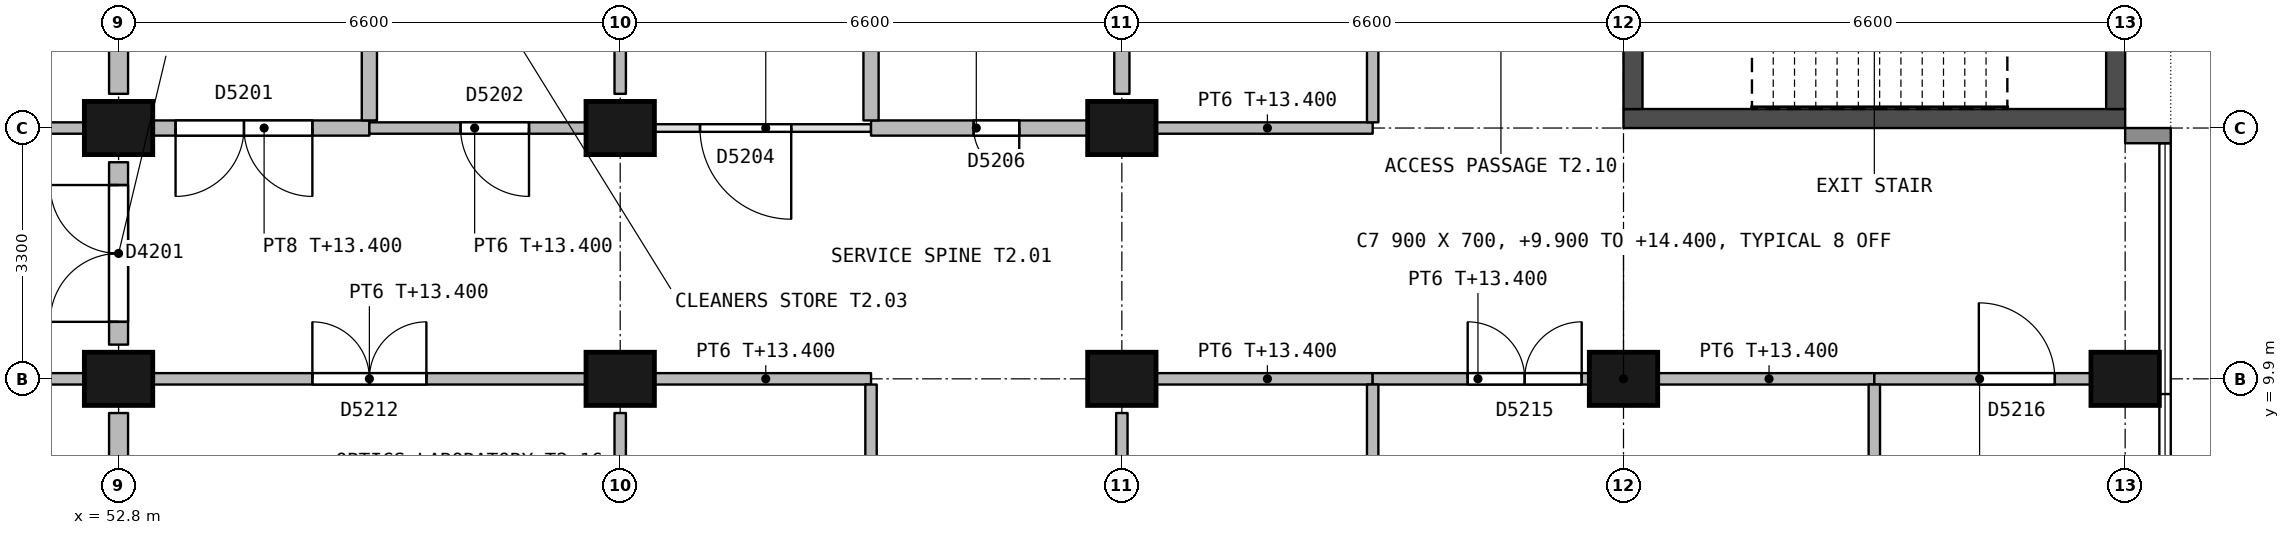
"""IFC4 building model, lengths in metres.
Left out: names, types, materials, properties, quantities, classifications, styles, units other than length and angle.
Written with IfcOpenShell. Run it as: python <this file> out.ifc"""

import sys

from ifc_helpers import new_model, si_unit, direction, frame, frame_2d, origin, origin_2d, place, context, subcontext, project, spatial, rectangle, extrude, element, fill, save


model = new_model("IFC4")
c1 = context("Model", 3, precision=1e-05, world=origin(), true_north=direction((0.0, 1.0)))
c2 = subcontext(c1, "Body", "Model", "MODEL_VIEW")
j1 = project(units=[si_unit("LENGTHUNIT", "METRE"), si_unit("PLANEANGLEUNIT", "RADIAN")], contexts=[c1])
p1 = place(None, origin())
s1 = spatial("IfcSite", under=j1, at=p1, CompositionType="ELEMENT")
p2 = place(p1, origin())
s2 = spatial("IfcBuilding", under=s1, at=p2, CompositionType="ELEMENT")
p3 = place(p2, frame((0.0, 0.0, 9.9)))
s3 = spatial("IfcBuildingStorey", under=s2, at=p3, CompositionType="ELEMENT", Elevation=9.9)
for number, where, z_axis, x_axis in (
    (1, (52.8, 9.9, 0.0), (0.0, 0.0, 1.0), (1.0, 0.0, 0.0)),
    (2, (52.8, 13.2, 0.0), (0.0, 0.0, 1.0), (1.0, 0.0, 0.0)),
    (3, (59.4, 9.9, 0.0), (0.0, 0.0, 1.0), (1.0, 0.0, 0.0)),
    (4, (59.4, 13.2, 0.0), (0.0, 0.0, 1.0), (1.0, 0.0, 0.0)),
    (5, (66.0, 9.9, 0.0), (0.0, 0.0, 1.0), (1.0, 0.0, 0.0)),
    (6, (66.0, 13.2, 0.0), (0.0, 0.0, 1.0), (1.0, 0.0, 0.0)),
    (7, (72.6, 9.9, 0.0), (0.0, 0.0, 1.0), (1.0, 0.0, 0.0)),
    (8, (79.2, 9.9, 0.0), (0.0, 0.0, 1.0), (1.0, 0.0, 0.0)),
):
    element("IfcColumn", number, at=place(p3, frame(where, z_axis=z_axis, x_axis=x_axis)), inside=s3, PredefinedType="COLUMN", context=c2, shape_type="SweptSolid", body=[
        extrude(rectangle(XDim=0.9, YDim=0.7, at=origin_2d()), origin(), (0.0, 0.0, 1.0), 4.5),
    ])
p4 = place(p3, frame((72.6, 13.325, 0.0), z_axis=(0.0, 0.0, 1.0), x_axis=(1.0, 0.0, 0.0)))
e9 = element("IfcWall", 9, at=p4, inside=s3, PredefinedType="SHEAR", context=c2, shape_type="SweptSolid", body=[
    extrude(rectangle(XDim=6.6, YDim=0.25, at=frame_2d((3.3, 0.0))), origin(), (0.0, 0.0, 1.0), 4.2),
])
p5 = place(p3, frame((72.725, 13.45, 0.0), z_axis=(0.0, 0.0, 1.0), x_axis=(0.0, 1.0, 0.0)))
e10 = element("IfcWall", 10, at=p5, inside=s3, PredefinedType="SHEAR", context=c2, shape_type="SweptSolid", body=[
    extrude(rectangle(XDim=9.4, YDim=0.25, at=frame_2d((4.7, 0.0))), origin(), (0.0, 0.0, 1.0), 4.2),
])
p6 = place(p5, frame((4.125, 0.0, 0.0)))
e11 = element("IfcOpeningElement", 11, at=p6, cuts=e10, PredefinedType="OPENING", context=c2, shape_type="SweptSolid", body=[
    extrude(rectangle(XDim=1.2, YDim=2.1, at=frame_2d((0.6, 1.05))), frame((0.0, 0.135, 0.0), z_axis=(0.0, -1.0, 0.0), x_axis=(1.0, 0.0, 0.0)), (0.0, 0.0, 1.0), 0.27),
])
p7 = place(p3, frame((79.075, 13.45, 0.0), z_axis=(0.0, 0.0, 1.0), x_axis=(0.0, 1.0, 0.0)))
e12 = element("IfcWall", 12, at=p7, inside=s3, PredefinedType="SHEAR", context=c2, shape_type="SweptSolid", body=[
    extrude(rectangle(XDim=9.4, YDim=0.25, at=frame_2d((4.7, 0.0))), origin(), (0.0, 0.0, 1.0), 4.2),
])
p8 = place(p7, frame((0.95, 0.0, 0.7)))
e13 = element("IfcOpeningElement", 13, at=p8, cuts=e12, PredefinedType="OPENING", context=c2, shape_type="SweptSolid", body=[
    extrude(rectangle(XDim=1.2, YDim=1.8, at=frame_2d((0.6, 0.9))), frame((0.0, 0.135, 0.0), z_axis=(0.0, -1.0, 0.0), x_axis=(1.0, 0.0, 0.0)), (0.0, 0.0, 1.0), 0.27),
])
p9 = place(p3, frame((79.2, 13.1, 0.0), z_axis=(0.0, 0.0, 1.0), x_axis=(1.0, 0.0, 0.0)))
e14 = element("IfcWall", 14, at=p9, inside=s3, PredefinedType="STANDARD", context=c2, shape_type="SweptSolid", body=[
    extrude(rectangle(XDim=0.6, YDim=0.2, at=frame_2d((0.3, 0.0))), origin(), (0.0, 0.0, 1.0), 3.5),
])
p10 = place(p3, frame((52.35, 13.2, 0.0), z_axis=(0.0, 0.0, 1.0), x_axis=(-1.0, 0.0, 0.0)))
e15 = element("IfcWall", 15, at=p10, inside=s3, PredefinedType="PARTITIONING", context=c2, shape_type="SweptSolid", body=[
    extrude(rectangle(XDim=2.85, YDim=0.15, at=frame_2d((1.425, 0.0))), origin(), (0.0, 0.0, 1.0), 3.5),
])
p11 = place(p10, frame((0.7, 0.0, 0.0)))
e16 = element("IfcOpeningElement", 16, at=p11, cuts=e15, PredefinedType="OPENING", context=c2, shape_type="SweptSolid", body=[
    extrude(rectangle(XDim=1.0, YDim=2.1, at=frame_2d((0.5, 1.05))), frame((0.0, 0.085, 0.0), z_axis=(0.0, -1.0, 0.0), x_axis=(1.0, 0.0, 0.0)), (0.0, 0.0, 1.0), 0.17),
])
p12 = place(p3, frame((46.6, 9.9, 0.0), z_axis=(0.0, 0.0, 1.0), x_axis=(1.0, 0.0, 0.0)))
e17 = element("IfcWall", 17, at=p12, inside=s3, PredefinedType="PARTITIONING", context=c2, shape_type="SweptSolid", body=[
    extrude(rectangle(XDim=5.75, YDim=0.15, at=frame_2d((2.875, 0.0))), origin(), (0.0, 0.0, 1.0), 3.5),
])
p13 = place(p12, frame((2.15, 0.0, 0.0)))
e18 = element("IfcOpeningElement", 18, at=p13, cuts=e17, PredefinedType="OPENING", context=c2, shape_type="SweptSolid", body=[
    extrude(rectangle(XDim=1.5, YDim=2.1, at=frame_2d((0.75, 1.05))), frame((0.0, 0.085, 0.0), z_axis=(0.0, -1.0, 0.0), x_axis=(1.0, 0.0, 0.0)), (0.0, 0.0, 1.0), 0.17),
])
p14 = place(p3, frame((52.8, 10.35, 0.0), z_axis=(0.0, 0.0, 1.0), x_axis=(0.0, 1.0, 0.0)))
e19 = element("IfcWall", 19, at=p14, inside=s3, PredefinedType="PARTITIONING", context=c2, shape_type="SweptSolid", body=[
    extrude(rectangle(XDim=2.4, YDim=0.25, at=frame_2d((1.2, 0.0))), origin(), (0.0, 0.0, 1.0), 3.6),
])
p15 = place(p14, frame((0.3, 0.0, 0.0)))
e20 = element("IfcOpeningElement", 20, at=p15, cuts=e19, PredefinedType="OPENING", context=c2, shape_type="SweptSolid", body=[
    extrude(rectangle(XDim=1.8, YDim=2.1, at=frame_2d((0.9, 1.05))), frame((0.0, 0.135, 0.0), z_axis=(0.0, -1.0, 0.0), x_axis=(1.0, 0.0, 0.0)), (0.0, 0.0, 1.0), 0.27),
])
p16 = place(p3, frame((52.8, 13.65, 0.0), z_axis=(0.0, 0.0, 1.0), x_axis=(0.0, 1.0, 0.0)))
e21 = element("IfcWall", 21, at=p16, inside=s3, PredefinedType="PARTITIONING", context=c2, shape_type="SweptSolid", body=[
    extrude(rectangle(XDim=9.0, YDim=0.25, at=frame_2d((4.5, 0.0))), origin(), (0.0, 0.0, 1.0), 3.3),
])
p17 = place(p3, frame((52.8, 3.9, 0.0), z_axis=(0.0, 0.0, 1.0), x_axis=(0.0, 1.0, 0.0)))
e22 = element("IfcWall", 22, at=p17, inside=s3, PredefinedType="PARTITIONING", context=c2, shape_type="SweptSolid", body=[
    extrude(rectangle(XDim=5.55, YDim=0.25, at=frame_2d((2.775, 0.0))), origin(), (0.0, 0.0, 1.0), 3.3),
])
p18 = place(p3, frame((56.1, 13.2, 0.0), z_axis=(0.0, 0.0, 1.0), x_axis=(-1.0, 0.0, 0.0)))
e23 = element("IfcWall", 23, at=p18, inside=s3, PredefinedType="PARTITIONING", context=c2, shape_type="SweptSolid", body=[
    extrude(rectangle(XDim=2.85, YDim=0.2, at=frame_2d((1.425, 0.0))), origin(), (0.0, 0.0, 1.0), 3.5),
])
p19 = place(p18, frame((0.75, 0.0, 0.0)))
e24 = element("IfcOpeningElement", 24, at=p19, cuts=e23, PredefinedType="OPENING", context=c2, shape_type="SweptSolid", body=[
    extrude(rectangle(XDim=1.8, YDim=2.4, at=frame_2d((0.9, 1.2))), frame((0.0, 0.11, 0.0), z_axis=(0.0, -1.0, 0.0), x_axis=(1.0, 0.0, 0.0)), (0.0, 0.0, 1.0), 0.22),
])
p20 = place(p3, frame((58.95, 13.2, 0.0), z_axis=(0.0, 0.0, 1.0), x_axis=(-1.0, 0.0, 0.0)))
e25 = element("IfcWall", 25, at=p20, inside=s3, PredefinedType="PARTITIONING", context=c2, shape_type="SweptSolid", body=[
    extrude(rectangle(XDim=2.85, YDim=0.15, at=frame_2d((1.425, 0.0))), origin(), (0.0, 0.0, 1.0), 3.5),
])
p21 = place(p20, frame((0.75, 0.0, 0.0)))
e26 = element("IfcOpeningElement", 26, at=p21, cuts=e25, PredefinedType="OPENING", context=c2, shape_type="SweptSolid", body=[
    extrude(rectangle(XDim=0.9, YDim=2.1, at=frame_2d((0.45, 1.05))), frame((0.0, 0.085, 0.0), z_axis=(0.0, -1.0, 0.0), x_axis=(1.0, 0.0, 0.0)), (0.0, 0.0, 1.0), 0.17),
])
p22 = place(p3, frame((59.85, 13.2, 0.0), z_axis=(0.0, 0.0, 1.0), x_axis=(1.0, 0.0, 0.0)))
e27 = element("IfcWall", 27, at=p22, inside=s3, PredefinedType="PARTITIONING", context=c2, shape_type="SweptSolid", body=[
    extrude(rectangle(XDim=2.85, YDim=0.1, at=frame_2d((1.425, 0.0))), origin(), (0.0, 0.0, 1.0), 3.5),
])
p23 = place(p22, frame((0.6, 0.0, 0.0)))
e28 = element("IfcOpeningElement", 28, at=p23, cuts=e27, PredefinedType="OPENING", context=c2, shape_type="SweptSolid", body=[
    extrude(rectangle(XDim=1.2, YDim=2.1, at=frame_2d((0.6, 1.05))), frame((0.0, 0.06, 0.0), z_axis=(0.0, -1.0, 0.0), x_axis=(1.0, 0.0, 0.0)), (0.0, 0.0, 1.0), 0.12),
])
p24 = place(p3, frame((62.7, 13.2, 0.0), z_axis=(0.0, 0.0, 1.0), x_axis=(1.0, 0.0, 0.0)))
e29 = element("IfcWall", 29, at=p24, inside=s3, PredefinedType="PARTITIONING", context=c2, shape_type="SweptSolid", body=[
    extrude(rectangle(XDim=2.85, YDim=0.2, at=frame_2d((1.425, 0.0))), origin(), (0.0, 0.0, 1.0), 3.5),
])
p25 = place(p24, frame((1.35, 0.0, 0.0)))
e30 = element("IfcOpeningElement", 30, at=p25, cuts=e29, PredefinedType="OPENING", context=c2, shape_type="SweptSolid", body=[
    extrude(rectangle(XDim=0.6, YDim=2.1, at=frame_2d((0.3, 1.05))), frame((0.0, 0.11, 0.0), z_axis=(0.0, -1.0, 0.0), x_axis=(1.0, 0.0, 0.0)), (0.0, 0.0, 1.0), 0.22),
])
p26 = place(p3, frame((69.3, 13.2, 0.0), z_axis=(0.0, 0.0, 1.0), x_axis=(-1.0, 0.0, 0.0)))
e31 = element("IfcWall", 31, at=p26, inside=s3, PredefinedType="PARTITIONING", context=c2, shape_type="SweptSolid", body=[
    extrude(rectangle(XDim=2.85, YDim=0.15, at=frame_2d((1.425, 0.0))), origin(), (0.0, 0.0, 1.0), 3.5),
])
p27 = place(p3, frame((53.25, 9.9, 0.0), z_axis=(0.0, 0.0, 1.0), x_axis=(1.0, 0.0, 0.0)))
e32 = element("IfcWall", 32, at=p27, inside=s3, PredefinedType="PARTITIONING", context=c2, shape_type="SweptSolid", body=[
    extrude(rectangle(XDim=5.7, YDim=0.15, at=frame_2d((2.85, 0.0))), origin(), (0.0, 0.0, 1.0), 3.5),
])
p28 = place(p27, frame((2.1, 0.0, 0.0)))
e33 = element("IfcOpeningElement", 33, at=p28, cuts=e32, PredefinedType="OPENING", context=c2, shape_type="SweptSolid", body=[
    extrude(rectangle(XDim=1.5, YDim=2.1, at=frame_2d((0.75, 1.05))), frame((0.0, 0.085, 0.0), z_axis=(0.0, -1.0, 0.0), x_axis=(1.0, 0.0, 0.0)), (0.0, 0.0, 1.0), 0.17),
])
p29 = place(p3, frame((59.85, 9.9, 0.0), z_axis=(0.0, 0.0, 1.0), x_axis=(1.0, 0.0, 0.0)))
e34 = element("IfcWall", 34, at=p29, inside=s3, PredefinedType="PARTITIONING", context=c2, shape_type="SweptSolid", body=[
    extrude(rectangle(XDim=2.85, YDim=0.15, at=frame_2d((1.425, 0.0))), origin(), (0.0, 0.0, 1.0), 3.5),
])
p30 = place(p3, frame((66.45, 9.9, 0.0), z_axis=(0.0, 0.0, 1.0), x_axis=(1.0, 0.0, 0.0)))
e35 = element("IfcWall", 35, at=p30, inside=s3, PredefinedType="PARTITIONING", context=c2, shape_type="SweptSolid", body=[
    extrude(rectangle(XDim=2.85, YDim=0.15, at=frame_2d((1.425, 0.0))), origin(), (0.0, 0.0, 1.0), 3.5),
])
p31 = place(p3, frame((69.3, 9.9, 0.0), z_axis=(0.0, 0.0, 1.0), x_axis=(1.0, 0.0, 0.0)))
e36 = element("IfcWall", 36, at=p31, inside=s3, PredefinedType="PARTITIONING", context=c2, shape_type="SweptSolid", body=[
    extrude(rectangle(XDim=2.85, YDim=0.15, at=frame_2d((1.425, 0.0))), origin(), (0.0, 0.0, 1.0), 3.5),
])
p32 = place(p31, frame((1.25, 0.0, 0.0)))
e37 = element("IfcOpeningElement", 37, at=p32, cuts=e36, PredefinedType="OPENING", context=c2, shape_type="SweptSolid", body=[
    extrude(rectangle(XDim=1.5, YDim=2.1, at=frame_2d((0.75, 1.05))), frame((0.0, 0.085, 0.0), z_axis=(0.0, -1.0, 0.0), x_axis=(1.0, 0.0, 0.0)), (0.0, 0.0, 1.0), 0.17),
])
p33 = place(p3, frame((73.05, 9.9, 0.0), z_axis=(0.0, 0.0, 1.0), x_axis=(1.0, 0.0, 0.0)))
e38 = element("IfcWall", 38, at=p33, inside=s3, PredefinedType="PARTITIONING", context=c2, shape_type="SweptSolid", body=[
    extrude(rectangle(XDim=2.85, YDim=0.15, at=frame_2d((1.425, 0.0))), origin(), (0.0, 0.0, 1.0), 3.5),
])
p34 = place(p3, frame((75.9, 9.9, 0.0), z_axis=(0.0, 0.0, 1.0), x_axis=(1.0, 0.0, 0.0)))
e39 = element("IfcWall", 39, at=p34, inside=s3, PredefinedType="PARTITIONING", context=c2, shape_type="SweptSolid", body=[
    extrude(rectangle(XDim=2.85, YDim=0.15, at=frame_2d((1.425, 0.0))), origin(), (0.0, 0.0, 1.0), 3.5),
])
p35 = place(p34, frame((1.375, 0.0, 0.0)))
e40 = element("IfcOpeningElement", 40, at=p35, cuts=e39, PredefinedType="OPENING", context=c2, shape_type="SweptSolid", body=[
    extrude(rectangle(XDim=1.0, YDim=2.1, at=frame_2d((0.5, 1.05))), frame((0.0, 0.085, 0.0), z_axis=(0.0, -1.0, 0.0), x_axis=(1.0, 0.0, 0.0)), (0.0, 0.0, 1.0), 0.17),
])
p36 = place(p3, frame((56.1, 13.3, 0.0), z_axis=(0.0, 0.0, 1.0), x_axis=(0.0, 1.0, 0.0)))
e41 = element("IfcWall", 41, at=p36, inside=s3, PredefinedType="PARTITIONING", context=c2, shape_type="SweptSolid", body=[
    extrude(rectangle(XDim=3.2, YDim=0.2, at=frame_2d((1.6, 0.0))), origin(), (0.0, 0.0, 1.0), 4.2),
])
p37 = place(p3, frame((59.4, 13.65, 0.0), z_axis=(0.0, 0.0, 1.0), x_axis=(0.0, 1.0, 0.0)))
e42 = element("IfcWall", 42, at=p37, inside=s3, PredefinedType="PARTITIONING", context=c2, shape_type="SweptSolid", body=[
    extrude(rectangle(XDim=2.775, YDim=0.15, at=frame_2d((1.388, 0.0))), origin(), (0.0, 0.0, 1.0), 3.3),
])
p38 = place(p3, frame((62.7, 13.3, 0.0), z_axis=(0.0, 0.0, 1.0), x_axis=(0.0, 1.0, 0.0)))
e43 = element("IfcWall", 43, at=p38, inside=s3, PredefinedType="PARTITIONING", context=c2, shape_type="SweptSolid", body=[
    extrude(rectangle(XDim=3.2, YDim=0.2, at=frame_2d((1.6, 0.0))), origin(), (0.0, 0.0, 1.0), 4.2),
])
p39 = place(p3, frame((66.0, 13.65, 0.0), z_axis=(0.0, 0.0, 1.0), x_axis=(0.0, 1.0, 0.0)))
e44 = element("IfcWall", 44, at=p39, inside=s3, PredefinedType="PARTITIONING", context=c2, shape_type="SweptSolid", body=[
    extrude(rectangle(XDim=2.75, YDim=0.2, at=frame_2d((1.375, 0.0))), origin(), (0.0, 0.0, 1.0), 3.3),
])
p40 = place(p3, frame((69.3, 23.1, 0.0), z_axis=(0.0, 0.0, 1.0), x_axis=(0.0, -1.0, 0.0)))
e45 = element("IfcWall", 45, at=p40, inside=s3, PredefinedType="PARTITIONING", context=c2, shape_type="SweptSolid", body=[
    extrude(rectangle(XDim=9.825, YDim=0.15, at=frame_2d((4.913, 0.0))), origin(), (0.0, 0.0, 1.0), 4.2),
])
p41 = place(p40, frame((4.05, 0.0, 0.0)))
e46 = element("IfcOpeningElement", 46, at=p41, cuts=e45, PredefinedType="OPENING", context=c2, shape_type="SweptSolid", body=[
    extrude(rectangle(XDim=1.8, YDim=2.4, at=frame_2d((0.9, 1.2))), frame((0.0, 0.085, 0.0), z_axis=(0.0, -1.0, 0.0), x_axis=(1.0, 0.0, 0.0)), (0.0, 0.0, 1.0), 0.17),
])
p42 = place(p3, frame((59.4, 3.975, 0.0), z_axis=(0.0, 0.0, 1.0), x_axis=(0.0, 1.0, 0.0)))
e47 = element("IfcWall", 47, at=p42, inside=s3, PredefinedType="PARTITIONING", context=c2, shape_type="SweptSolid", body=[
    extrude(rectangle(XDim=5.475, YDim=0.15, at=frame_2d((2.737, 0.0))), origin(), (0.0, 0.0, 1.0), 3.3),
])
p43 = place(p3, frame((62.7, 9.825, 0.0), z_axis=(0.0, 0.0, 1.0), x_axis=(0.0, -1.0, 0.0)))
e48 = element("IfcWall", 48, at=p43, inside=s3, PredefinedType="PARTITIONING", context=c2, shape_type="SweptSolid", body=[
    extrude(rectangle(XDim=5.85, YDim=0.15, at=frame_2d((2.925, 0.0))), origin(), (0.0, 0.0, 1.0), 4.2),
])
p44 = place(p43, frame((2.425, 0.0, 0.0)))
e49 = element("IfcOpeningElement", 49, at=p44, cuts=e48, PredefinedType="OPENING", context=c2, shape_type="SweptSolid", body=[
    extrude(rectangle(XDim=1.0, YDim=2.1, at=frame_2d((0.5, 1.05))), frame((0.0, 0.085, 0.0), z_axis=(0.0, -1.0, 0.0), x_axis=(1.0, 0.0, 0.0)), (0.0, 0.0, 1.0), 0.17),
])
p45 = place(p3, frame((66.0, 3.975, 0.0), z_axis=(0.0, 0.0, 1.0), x_axis=(0.0, 1.0, 0.0)))
e50 = element("IfcWall", 50, at=p45, inside=s3, PredefinedType="PARTITIONING", context=c2, shape_type="SweptSolid", body=[
    extrude(rectangle(XDim=5.475, YDim=0.15, at=frame_2d((2.737, 0.0))), origin(), (0.0, 0.0, 1.0), 3.3),
])
p46 = place(p45, frame((2.425, 0.0, 0.0)))
e51 = element("IfcOpeningElement", 51, at=p46, cuts=e50, PredefinedType="OPENING", context=c2, shape_type="SweptSolid", body=[
    extrude(rectangle(XDim=1.0, YDim=2.1, at=frame_2d((0.5, 1.05))), frame((0.0, 0.085, 0.0), z_axis=(0.0, -1.0, 0.0), x_axis=(1.0, 0.0, 0.0)), (0.0, 0.0, 1.0), 0.17),
])
for number, where, z_axis, x_axis in (
    (52, (69.3, 3.975, 0.0), (0.0, 0.0, 1.0), (0.0, 1.0, 0.0)),
    (53, (75.9, 3.975, 0.0), (0.0, 0.0, 1.0), (0.0, 1.0, 0.0)),
):
    element("IfcWall", number, at=place(p3, frame(where, z_axis=z_axis, x_axis=x_axis)), inside=s3, PredefinedType="PARTITIONING", context=c2, shape_type="SweptSolid", body=[
        extrude(rectangle(XDim=5.85, YDim=0.15, at=frame_2d((2.925, 0.0))), origin(), (0.0, 0.0, 1.0), 4.2),
    ])
p47 = place(p15, origin())
e54 = element("IfcDoor", 54, at=p47, inside=s3, OperationType="DOUBLE_DOOR_SINGLE_SWING", PredefinedType="DOOR", context=c2, shape_type="SweptSolid", body=[
    extrude(rectangle(XDim=1.8, YDim=2.1, at=frame_2d((0.9, 1.05))), frame((0.0, 0.03, 0.0), z_axis=(0.0, -1.0, 0.0), x_axis=(1.0, 0.0, 0.0)), (0.0, 0.0, 1.0), 0.06),
])
fill(e20, e54)
p48 = place(p19, origin())
e55 = element("IfcDoor", 55, at=p48, inside=s3, OperationType="DOUBLE_DOOR_SINGLE_SWING", PredefinedType="DOOR", context=c2, shape_type="SweptSolid", body=[
    extrude(rectangle(XDim=1.8, YDim=2.4, at=frame_2d((0.9, 1.2))), frame((0.0, 0.03, 0.0), z_axis=(0.0, -1.0, 0.0), x_axis=(1.0, 0.0, 0.0)), (0.0, 0.0, 1.0), 0.06),
])
fill(e24, e55)
p49 = place(p21, origin())
e56 = element("IfcDoor", 56, at=p49, inside=s3, OperationType="SINGLE_SWING_LEFT", PredefinedType="DOOR", context=c2, shape_type="SweptSolid", body=[
    extrude(rectangle(XDim=0.9, YDim=2.1, at=frame_2d((0.45, 1.05))), frame((0.0, 0.027, 0.0), z_axis=(0.0, -1.0, 0.0), x_axis=(1.0, 0.0, 0.0)), (0.0, 0.0, 1.0), 0.054),
])
fill(e26, e56)
p50 = place(p23, origin())
e57 = element("IfcDoor", 57, at=p50, inside=s3, OperationType="SINGLE_SWING_RIGHT", PredefinedType="DOOR", context=c2, shape_type="SweptSolid", body=[
    extrude(rectangle(XDim=1.2, YDim=2.1, at=frame_2d((0.6, 1.05))), frame((0.0, 0.022, 0.0), z_axis=(0.0, -1.0, 0.0), x_axis=(1.0, 0.0, 0.0)), (0.0, 0.0, 1.0), 0.044),
])
fill(e28, e57)
p51 = place(p25, origin())
e58 = element("IfcDoor", 58, at=p51, inside=s3, OperationType="SINGLE_SWING_RIGHT", PredefinedType="DOOR", context=c2, shape_type="SweptSolid", body=[
    extrude(rectangle(XDim=0.6, YDim=2.1, at=frame_2d((0.3, 1.05))), frame((0.0, 0.03, 0.0), z_axis=(0.0, -1.0, 0.0), x_axis=(1.0, 0.0, 0.0)), (0.0, 0.0, 1.0), 0.06),
])
fill(e30, e58)
p52 = place(p28, origin())
e59 = element("IfcDoor", 59, at=p52, inside=s3, OperationType="DOUBLE_DOOR_SINGLE_SWING", PredefinedType="DOOR", context=c2, shape_type="SweptSolid", body=[
    extrude(rectangle(XDim=1.5, YDim=2.1, at=frame_2d((0.75, 1.05))), frame((0.0, 0.027, 0.0), z_axis=(0.0, -1.0, 0.0), x_axis=(1.0, 0.0, 0.0)), (0.0, 0.0, 1.0), 0.054),
])
fill(e33, e59)
p53 = place(p32, origin())
e60 = element("IfcDoor", 60, at=p53, inside=s3, OperationType="DOUBLE_DOOR_SINGLE_SWING", PredefinedType="DOOR", context=c2, shape_type="SweptSolid", body=[
    extrude(rectangle(XDim=1.5, YDim=2.1, at=frame_2d((0.75, 1.05))), frame((0.0, 0.027, 0.0), z_axis=(0.0, -1.0, 0.0), x_axis=(1.0, 0.0, 0.0)), (0.0, 0.0, 1.0), 0.054),
])
fill(e37, e60)
p54 = place(p35, origin())
e61 = element("IfcDoor", 61, at=p54, inside=s3, OperationType="SINGLE_SWING_LEFT", PredefinedType="DOOR", context=c2, shape_type="SweptSolid", body=[
    extrude(rectangle(XDim=1.0, YDim=2.1, at=frame_2d((0.5, 1.05))), frame((0.0, 0.027, 0.0), z_axis=(0.0, -1.0, 0.0), x_axis=(1.0, 0.0, 0.0)), (0.0, 0.0, 1.0), 0.054),
])
fill(e40, e61)
save(model, sys.argv[1])
